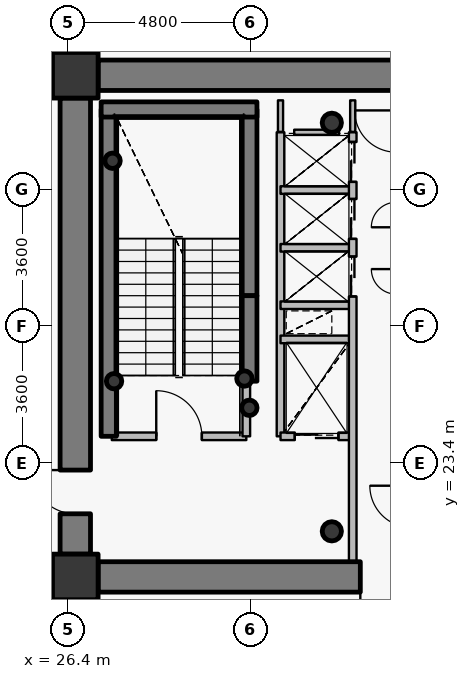
"""IFC4 building model, lengths in metres.
Left out: names, types, materials, properties, quantities, classifications, styles, units other than length and angle.
Written with IfcOpenShell. Run it as: python <this file> out.ifc"""

import sys

from ifc_helpers import new_model, si_unit, direction, frame, frame_2d, origin, origin_2d, place, context, subcontext, project, spatial, rectangle, hollow_circle, extrude, source, transform, mapped, element, fill, save


model = new_model("IFC4")
c1 = context("Model", 3, precision=1e-05, world=origin(), true_north=direction((0.0, 1.0)))
c2 = subcontext(c1, "Body", "Model", "MODEL_VIEW")
j1 = project(units=[si_unit("LENGTHUNIT", "METRE"), si_unit("PLANEANGLEUNIT", "RADIAN")], contexts=[c1])
p1 = place(None, origin())
s1 = spatial("IfcSite", under=j1, at=p1, CompositionType="ELEMENT")
p2 = place(p1, origin())
s2 = spatial("IfcBuilding", under=s1, at=p2, CompositionType="ELEMENT")
p3 = place(p2, frame((0.0, 0.0, 156.15)))
s3 = spatial("IfcBuildingStorey", under=s2, at=p3, CompositionType="ELEMENT", Elevation=156.15)
for number, where, z_axis, x_axis in (
    (1, (26.6, 20.4, 0.0), (0.0, 0.0, 1.0), (1.0, 0.0, 0.0)),
    (2, (26.6, 33.6, 0.0), (0.0, 0.0, 1.0), (1.0, 0.0, 0.0)),
):
    element("IfcColumn", number, at=place(p3, frame(where, z_axis=z_axis, x_axis=x_axis)), inside=s3, PredefinedType="COLUMN", context=c2, shape_type="SweptSolid", body=[
        extrude(rectangle(XDim=1.2, YDim=1.2, at=origin_2d()), origin(), (0.0, 0.0, 1.0), 3.75),
    ])
for number, where, z_axis, x_axis in (
    (3, (33.35, 21.6, 0.0), (0.0, 0.0, 1.0), (1.0, 0.0, 0.0)),
    (4, (33.35, 32.35, 0.0), (0.0, 0.0, 1.0), (1.0, 0.0, 0.0)),
):
    element("IfcColumn", number, at=place(p3, frame(where, z_axis=z_axis, x_axis=x_axis)), inside=s3, PredefinedType="COLUMN", context=c2, shape_type="SweptSolid", body=[
        extrude(hollow_circle(Radius=0.254, WallThickness=0.02, at=origin_2d()), origin(), (0.0, 0.0, 1.0), 3.75),
    ])
p4 = place(p3, frame((27.48, 24.1, 0.0), z_axis=(0.0, 0.0, 1.0), x_axis=(0.0, 1.0, 0.0)))
e5 = element("IfcWall", 5, at=p4, inside=s3, PredefinedType="SHEAR", context=c2, shape_type="SweptSolid", body=[
    extrude(rectangle(XDim=8.6, YDim=0.4, at=frame_2d((4.3, 0.0))), origin(), (0.0, 0.0, 1.0), 3.75),
])
p5 = place(p3, frame((31.18, 27.8, 0.0), z_axis=(0.0, 0.0, 1.0), x_axis=(0.0, 1.0, 0.0)))
e6 = element("IfcWall", 6, at=p5, inside=s3, PredefinedType="SHEAR", context=c2, shape_type="SweptSolid", body=[
    extrude(rectangle(XDim=4.9, YDim=0.4, at=frame_2d((2.45, 0.0))), origin(), (0.0, 0.0, 1.0), 3.75),
])
p6 = place(p3, frame((27.28, 32.7, 0.0), z_axis=(0.0, 0.0, 1.0), x_axis=(1.0, 0.0, 0.0)))
e7 = element("IfcWall", 7, at=p6, inside=s3, PredefinedType="SHEAR", context=c2, shape_type="SweptSolid", body=[
    extrude(rectangle(XDim=4.1, YDim=0.4, at=frame_2d((2.05, 0.0))), origin(), (0.0, 0.0, 1.0), 3.75),
])
for number, where, z_axis, x_axis in (
    (8, (27.58, 31.35, 0.0), (0.0, 0.0, 1.0), (1.0, 0.0, 0.0)),
    (9, (31.05, 25.62, 0.0), (0.0, 0.0, 1.0), (1.0, 0.0, 0.0)),
    (10, (31.18, 24.85, 0.0), (0.0, 0.0, 1.0), (1.0, 0.0, 0.0)),
    (11, (27.62, 25.55, 0.0), (0.0, 0.0, 1.0), (1.0, 0.0, 0.0)),
):
    element("IfcColumn", number, at=place(p3, frame(where, z_axis=z_axis, x_axis=x_axis)), inside=s3, PredefinedType="COLUMN", context=c2, shape_type="SweptSolid", body=[
        extrude(hollow_circle(Radius=0.203, WallThickness=0.016, at=origin_2d()), origin(), (0.0, 0.0, 1.0), 3.75),
    ])
p7 = place(p3, frame((27.2, 33.6, 0.0), z_axis=(0.0, 0.0, 1.0), x_axis=(1.0, 0.0, 0.0)))
e12 = element("IfcWall", 12, at=p7, inside=s3, PredefinedType="SHEAR", context=c2, shape_type="SweptSolid", body=[
    extrude(rectangle(XDim=17.6, YDim=0.8, at=frame_2d((8.8, 0.0))), origin(), (0.0, 0.0, 1.0), 2.95),
])
p8 = place(p7, frame((13.45, 0.0, 0.0)))
e13 = element("IfcOpeningElement", 13, at=p8, cuts=e12, PredefinedType="OPENING", context=c2, shape_type="SweptSolid", body=[
    extrude(rectangle(XDim=1.15, YDim=2.15, at=origin_2d()), frame((0.575, 0.41, 1.075), z_axis=(0.0, -1.0, 0.0), x_axis=(1.0, 0.0, 0.0)), (0.0, 0.0, 1.0), 0.82),
])
p9 = place(p3, frame((44.8, 20.4, 0.0), z_axis=(0.0, 0.0, 1.0), x_axis=(-1.0, 0.0, 0.0)))
e14 = element("IfcWall", 14, at=p9, inside=s3, PredefinedType="SHEAR", context=c2, shape_type="SweptSolid", body=[
    extrude(rectangle(XDim=17.6, YDim=0.8, at=frame_2d((8.8, 0.0))), origin(), (0.0, 0.0, 1.0), 2.95),
])
p10 = place(p9, frame((9.55, 0.0, 0.0)))
e15 = element("IfcOpeningElement", 15, at=p10, cuts=e14, PredefinedType="OPENING", context=c2, shape_type="SweptSolid", body=[
    extrude(rectangle(XDim=1.15, YDim=2.15, at=origin_2d()), frame((0.575, 0.41, 1.075), z_axis=(0.0, -1.0, 0.0), x_axis=(1.0, 0.0, 0.0)), (0.0, 0.0, 1.0), 0.82),
])
p11 = place(p3, frame((26.6, 21.0, 0.0), z_axis=(0.0, 0.0, 1.0), x_axis=(0.0, 1.0, 0.0)))
e16 = element("IfcWall", 16, at=p11, inside=s3, PredefinedType="SHEAR", context=c2, shape_type="SweptSolid", body=[
    extrude(rectangle(XDim=12.0, YDim=0.8, at=frame_2d((6.0, 0.0))), origin(), (0.0, 0.0, 1.0), 2.95),
])
p12 = place(p11, frame((1.061, 0.0, 0.0)))
e17 = element("IfcOpeningElement", 17, at=p12, cuts=e16, PredefinedType="OPENING", context=c2, shape_type="SweptSolid", body=[
    extrude(rectangle(XDim=1.15, YDim=2.15, at=origin_2d()), frame((0.575, 0.41, 1.075), z_axis=(0.0, -1.0, 0.0), x_axis=(1.0, 0.0, 0.0)), (0.0, 0.0, 1.0), 0.82),
])
p13 = place(p3, frame((31.18, 25.55, 0.0), z_axis=(0.0, 0.0, 1.0), x_axis=(0.0, 1.0, 0.0)))
e18 = element("IfcWall", 18, at=p13, inside=s3, PredefinedType="SHEAR", context=c2, shape_type="SweptSolid", body=[
    extrude(rectangle(XDim=2.25, YDim=0.4, at=frame_2d((1.125, 0.0))), origin(), (0.0, 0.0, 1.0), 3.1),
])
p14 = place(p3, frame((27.56, 24.1, 0.0), z_axis=(0.0, 0.0, 1.0), x_axis=(1.0, 0.0, 0.0)))
e19 = element("IfcWall", 19, at=p14, inside=s3, PredefinedType="PARTITIONING", context=c2, shape_type="SweptSolid", body=[
    extrude(rectangle(XDim=3.54, YDim=0.2, at=frame_2d((1.77, 0.0))), origin(), (0.0, 0.0, 1.0), 3.5),
])
p15 = place(p14, frame((1.17, 0.0, 0.0)))
e20 = element("IfcOpeningElement", 20, at=p15, cuts=e19, PredefinedType="OPENING", context=c2, shape_type="SweptSolid", body=[
    extrude(rectangle(XDim=1.2, YDim=2.15, at=origin_2d()), frame((0.6, 0.11, 1.075), z_axis=(0.0, -1.0, 0.0), x_axis=(1.0, 0.0, 0.0)), (0.0, 0.0, 1.0), 0.22),
])
p16 = place(p3, frame((31.1, 24.1, 0.0), z_axis=(0.0, 0.0, 1.0), x_axis=(0.0, 1.0, 0.0)))
e21 = element("IfcWall", 21, at=p16, inside=s3, PredefinedType="PARTITIONING", context=c2, shape_type="SweptSolid", body=[
    extrude(rectangle(XDim=1.44, YDim=0.2, at=frame_2d((0.72, 0.0))), origin(), (0.0, 0.0, 1.0), 3.5),
])
p17 = place(p3, frame((32.0, 24.1, 0.0), z_axis=(0.0, 0.0, 1.0), x_axis=(0.0, 1.0, 0.0)))
e22 = element("IfcWall", 22, at=p17, inside=s3, PredefinedType="PARTITIONING", context=c2, shape_type="SweptSolid", body=[
    extrude(rectangle(XDim=8.0, YDim=0.2, at=frame_2d((4.0, 0.0))), origin(), (0.0, 0.0, 1.0), 3.5),
])
p18 = place(p3, frame((32.0, 24.1, 0.0), z_axis=(0.0, 0.0, 1.0), x_axis=(1.0, 0.0, 0.0)))
e23 = element("IfcWall", 23, at=p18, inside=s3, PredefinedType="PARTITIONING", context=c2, shape_type="SweptSolid", body=[
    extrude(rectangle(XDim=1.9, YDim=0.2, at=frame_2d((0.95, 0.0))), origin(), (0.0, 0.0, 1.0), 3.085),
])
p19 = place(p18, frame((0.375, 0.0, 0.0)))
e24 = element("IfcOpeningElement", 24, at=p19, cuts=e23, PredefinedType="OPENING", context=c2, shape_type="SweptSolid", body=[
    extrude(rectangle(XDim=1.15, YDim=2.15, at=origin_2d()), frame((0.575, 0.11, 1.075), z_axis=(0.0, -1.0, 0.0), x_axis=(1.0, 0.0, 0.0)), (0.0, 0.0, 1.0), 0.22),
])
for number, where, z_axis, x_axis in (
    (25, (32.0, 26.65, 0.0), (0.0, 0.0, 1.0), (1.0, 0.0, 0.0)),
    (26, (32.0, 27.55, 0.0), (0.0, 0.0, 1.0), (1.0, 0.0, 0.0)),
    (27, (32.0, 29.06, 0.0), (0.0, 0.0, 1.0), (1.0, 0.0, 0.0)),
    (28, (32.0, 30.58, 0.0), (0.0, 0.0, 1.0), (1.0, 0.0, 0.0)),
):
    element("IfcWall", number, at=place(p3, frame(where, z_axis=z_axis, x_axis=x_axis)), inside=s3, PredefinedType="PARTITIONING", context=c2, shape_type="SweptSolid", body=[
        extrude(rectangle(XDim=1.9, YDim=0.2, at=frame_2d((0.95, 0.0))), origin(), (0.0, 0.0, 1.0), 3.085),
    ])
p20 = place(p3, frame((33.9, 20.8, 0.0), z_axis=(0.0, 0.0, 1.0), x_axis=(0.0, 1.0, 0.0)))
e29 = element("IfcWall", 29, at=p20, inside=s3, PredefinedType="PARTITIONING", context=c2, shape_type="SweptSolid", body=[
    extrude(rectangle(XDim=11.3, YDim=0.2, at=frame_2d((5.65, 0.0))), origin(), (0.0, 0.0, 1.0), 3.085),
])
p21 = place(p20, frame((6.98, 0.0, 0.0)))
e30 = element("IfcOpeningElement", 30, at=p21, cuts=e29, PredefinedType="OPENING", context=c2, shape_type="SweptSolid", body=[
    extrude(rectangle(XDim=1.05, YDim=2.15, at=origin_2d()), frame((0.525, 0.11, 1.075), z_axis=(0.0, -1.0, 0.0), x_axis=(1.0, 0.0, 0.0)), (0.0, 0.0, 1.0), 0.22),
])
p22 = place(p20, frame((8.495, 0.0, 0.0)))
e31 = element("IfcOpeningElement", 31, at=p22, cuts=e29, PredefinedType="OPENING", context=c2, shape_type="SweptSolid", body=[
    extrude(rectangle(XDim=1.05, YDim=2.15, at=origin_2d()), frame((0.525, 0.11, 1.075), z_axis=(0.0, -1.0, 0.0), x_axis=(1.0, 0.0, 0.0)), (0.0, 0.0, 1.0), 0.22),
])
p23 = place(p20, frame((9.995, 0.0, 0.0)))
e32 = element("IfcOpeningElement", 32, at=p23, cuts=e29, PredefinedType="OPENING", context=c2, shape_type="SweptSolid", body=[
    extrude(rectangle(XDim=1.05, YDim=2.15, at=origin_2d()), frame((0.525, 0.11, 1.075), z_axis=(0.0, -1.0, 0.0), x_axis=(1.0, 0.0, 0.0)), (0.0, 0.0, 1.0), 0.22),
])
p24 = place(p3, frame((32.36, 32.1, 0.0), z_axis=(0.0, 0.0, 1.0), x_axis=(1.0, 0.0, 0.0)))
e33 = element("IfcWall", 33, at=p24, inside=s3, PredefinedType="PARTITIONING", context=c2, shape_type="SweptSolid", body=[
    extrude(rectangle(XDim=1.18, YDim=0.135, at=frame_2d((0.59, 0.0))), origin(), (0.0, 0.0, 1.0), 3.085),
])
p25 = place(p3, frame((32.0, 32.94, 0.0), z_axis=(0.0, 0.0, 1.0), x_axis=(0.0, -1.0, 0.0)))
e34 = element("IfcWall", 34, at=p25, inside=s3, PredefinedType="PARTITIONING", context=c2, shape_type="SweptSolid", body=[
    extrude(rectangle(XDim=0.83, YDim=0.135, at=frame_2d((0.415, 0.0))), origin(), (0.0, 0.0, 1.0), 3.035),
])
p26 = place(p3, frame((33.9, 32.11, 0.0), z_axis=(0.0, 0.0, 1.0), x_axis=(0.0, 1.0, 0.0)))
e35 = element("IfcWall", 35, at=p26, inside=s3, PredefinedType="PARTITIONING", context=c2, shape_type="SweptSolid", body=[
    extrude(rectangle(XDim=0.83, YDim=0.135, at=frame_2d((0.415, 0.0))), origin(), (0.0, 0.0, 1.0), 3.085),
])
p27 = place(p3, frame((27.19, 34.0, 0.0), z_axis=(0.0, 0.0, 1.0), x_axis=(-1.0, 0.0, 0.0)))
e36 = element("IfcWall", 36, at=p27, inside=s3, PredefinedType="PARTITIONING", context=c2, shape_type="SweptSolid", body=[
    extrude(rectangle(XDim=0.99, YDim=0.135, at=frame_2d((0.495, 0.0))), origin(), (0.0, 0.0, 1.0), 2.935),
])
p28 = place(p3, frame((26.2, 33.692, 0.0), z_axis=(0.0, 0.0, 1.0), x_axis=(0.0, -1.0, 0.0)))
e37 = element("IfcWall", 37, at=p28, inside=s3, PredefinedType="PARTITIONING", context=c2, shape_type="SweptSolid", body=[
    extrude(rectangle(XDim=0.682, YDim=0.135, at=frame_2d((0.341, 0.0))), origin(), (0.0, 0.0, 1.0), 3.5),
])
p29 = place(p3, frame((26.2, 20.99, 0.0), z_axis=(0.0, 0.0, 1.0), x_axis=(0.0, -1.0, 0.0)))
e38 = element("IfcWall", 38, at=p29, inside=s3, PredefinedType="PARTITIONING", context=c2, shape_type="SweptSolid", body=[
    extrude(rectangle(XDim=0.99, YDim=0.135, at=frame_2d((0.495, 0.0))), origin(), (0.0, 0.0, 1.0), 3.5),
])
p30 = place(p3, frame((26.508, 20.0, 0.0), z_axis=(0.0, 0.0, 1.0), x_axis=(1.0, 0.0, 0.0)))
e39 = element("IfcWall", 39, at=p30, inside=s3, PredefinedType="PARTITIONING", context=c2, shape_type="SweptSolid", body=[
    extrude(rectangle(XDim=0.682, YDim=0.135, at=frame_2d((0.341, 0.0))), origin(), (0.0, 0.0, 1.0), 2.935),
])
m1 = source(origin(), c2, "Body", "SweptSolid", [
    extrude(rectangle(XDim=1.15, YDim=2.15, at=origin_2d()), frame((0.575, 0.025, 1.075), z_axis=(0.0, -1.0, 0.0), x_axis=(1.0, 0.0, 0.0)), (0.0, 0.0, 1.0), 0.05),
])
p31 = place(p12, origin())
e40 = element("IfcDoor", 40, at=p31, inside=s3, OperationType="SINGLE_SWING_RIGHT", PredefinedType="DOOR", context=c2, shape_type="MappedRepresentation", body=[
    mapped(m1, transform((0.0, 0.0, 0.0), x_axis=(1.0, 0.0, 0.0), y_axis=(0.0, 1.0, 0.0), z_axis=(0.0, 0.0, 1.0), scale=1.0)),
])
fill(e17, e40)
p32 = place(p10, origin())
e41 = element("IfcDoor", 41, at=p32, inside=s3, OperationType="SINGLE_SWING_RIGHT", PredefinedType="DOOR", context=c2, shape_type="MappedRepresentation", body=[
    mapped(m1, transform((0.0, 0.0, 0.0), x_axis=(1.0, 0.0, 0.0), y_axis=(0.0, 1.0, 0.0), z_axis=(0.0, 0.0, 1.0), scale=1.0)),
])
fill(e15, e41)
m2 = source(origin(), c2, "Body", "SweptSolid", [
    extrude(rectangle(XDim=1.2, YDim=2.15, at=origin_2d()), frame((0.6, 0.025, 1.075), z_axis=(0.0, -1.0, 0.0), x_axis=(1.0, 0.0, 0.0)), (0.0, 0.0, 1.0), 0.05),
])
p33 = place(p15, origin())
e42 = element("IfcDoor", 42, at=p33, inside=s3, OperationType="SINGLE_SWING_LEFT", PredefinedType="DOOR", context=c2, shape_type="MappedRepresentation", body=[
    mapped(m2, transform((0.0, 0.0, 0.0), x_axis=(1.0, 0.0, 0.0), y_axis=(0.0, 1.0, 0.0), z_axis=(0.0, 0.0, 1.0), scale=1.0)),
])
fill(e20, e42)
m3 = source(origin(), c2, "Body", "SweptSolid", [
    extrude(rectangle(XDim=1.15, YDim=2.15, at=origin_2d()), frame((0.575, 0.025, 1.075), z_axis=(0.0, -1.0, 0.0), x_axis=(1.0, 0.0, 0.0)), (0.0, 0.0, 1.0), 0.05),
])
p34 = place(p19, origin())
e43 = element("IfcDoor", 43, at=p34, inside=s3, OperationType="DOUBLE_DOOR_SLIDING", PredefinedType="USERDEFINED", context=c2, shape_type="MappedRepresentation", body=[
    mapped(m3, transform((0.0, 0.0, 0.0), x_axis=(1.0, 0.0, 0.0), y_axis=(0.0, 1.0, 0.0), z_axis=(0.0, 0.0, 1.0), scale=1.0)),
])
fill(e24, e43)
m4 = source(origin(), c2, "Body", "SweptSolid", [
    extrude(rectangle(XDim=1.05, YDim=2.15, at=origin_2d()), frame((0.525, 0.025, 1.075), z_axis=(0.0, -1.0, 0.0), x_axis=(1.0, 0.0, 0.0)), (0.0, 0.0, 1.0), 0.05),
])
p35 = place(p21, origin())
e44 = element("IfcDoor", 44, at=p35, inside=s3, OperationType="DOUBLE_DOOR_SLIDING", PredefinedType="USERDEFINED", context=c2, shape_type="MappedRepresentation", body=[
    mapped(m4, transform((0.0, 0.0, 0.0), x_axis=(1.0, 0.0, 0.0), y_axis=(0.0, 1.0, 0.0), z_axis=(0.0, 0.0, 1.0), scale=1.0)),
])
fill(e30, e44)
p36 = place(p22, origin())
e45 = element("IfcDoor", 45, at=p36, inside=s3, OperationType="DOUBLE_DOOR_SLIDING", PredefinedType="USERDEFINED", context=c2, shape_type="MappedRepresentation", body=[
    mapped(m4, transform((0.0, 0.0, 0.0), x_axis=(1.0, 0.0, 0.0), y_axis=(0.0, 1.0, 0.0), z_axis=(0.0, 0.0, 1.0), scale=1.0)),
])
fill(e31, e45)
p37 = place(p23, origin())
e46 = element("IfcDoor", 46, at=p37, inside=s3, OperationType="DOUBLE_DOOR_SLIDING", PredefinedType="USERDEFINED", context=c2, shape_type="MappedRepresentation", body=[
    mapped(m4, transform((0.0, 0.0, 0.0), x_axis=(1.0, 0.0, 0.0), y_axis=(0.0, 1.0, 0.0), z_axis=(0.0, 0.0, 1.0), scale=1.0)),
])
fill(e32, e46)
save(model, sys.argv[1])
